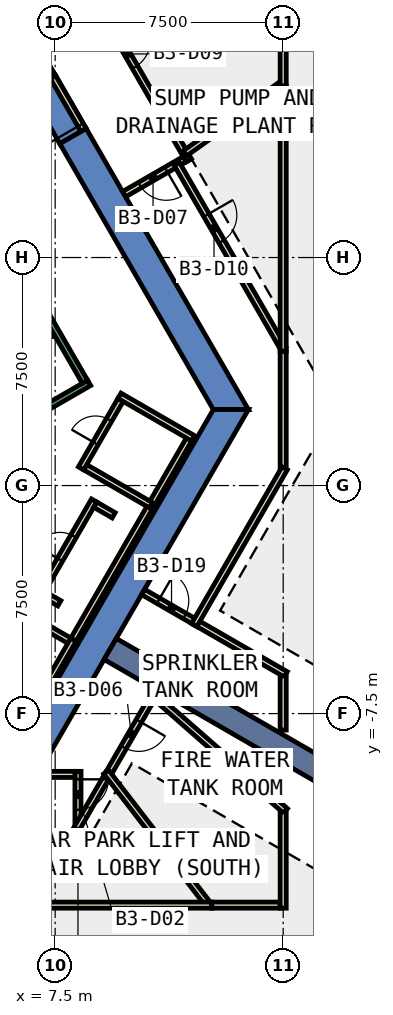
"""IFC4 building model, lengths in metres.
Left out: names, types, materials, properties, quantities, classifications, styles, units other than length and angle.
Written with IfcOpenShell. Run it as: python <this file> out.ifc"""

import sys

from ifc_helpers import new_model, si_unit, direction, frame, frame_2d, origin, place, context, subcontext, project, spatial, polyline, rectangle, outline, extrude, element, fill, save


model = new_model("IFC4")
c1 = context("Model", 3, precision=1e-05, world=origin(), true_north=direction((0.0, 1.0)))
c2 = subcontext(c1, "Body", "Model", "MODEL_VIEW")
j1 = project(units=[si_unit("LENGTHUNIT", "METRE"), si_unit("PLANEANGLEUNIT", "RADIAN")], contexts=[c1])
p1 = place(None, origin())
s1 = spatial("IfcSite", under=j1, at=p1, CompositionType="ELEMENT")
p2 = place(p1, origin())
s2 = spatial("IfcBuilding", under=s1, at=p2, CompositionType="ELEMENT")
p3 = place(p2, frame((0.0, 0.0, -16.5)))
s3 = spatial("IfcBuildingStorey", under=s2, at=p3, CompositionType="ELEMENT", Elevation=-16.5)
p4 = place(p3, origin())
e1 = element("IfcWall", 1, at=p4, inside=s3, PredefinedType="SHEAR", context=c2, shape_type="SweptSolid", body=[
    extrude(outline(polyline([(8.517, 11.748), (7.651, 11.248), (12.702, 2.5), (13.856, 2.5), (8.517, 11.748)])), origin(), (0.0, 0.0, 1.0), 5.08),
])
p5 = place(p3, origin())
e2 = element("IfcWall", 2, at=p5, inside=s3, PredefinedType="SHEAR", context=c2, shape_type="SweptSolid", body=[
    extrude(outline(polyline([(6.651, 12.98), (7.517, 13.48), (6.928, 14.5), (6.351, 13.5), (6.651, 12.98)])), origin(), (0.0, 0.0, 1.0), 5.08),
])
p6 = place(p3, frame((0.0, 0.0, 3.6)))
e3 = element("IfcWall", 3, at=p6, inside=s3, PredefinedType="SHEAR", context=c2, shape_type="SweptSolid", body=[
    extrude(outline(polyline([(7.517, 13.48), (6.651, 12.98), (7.651, 11.248), (8.517, 11.748), (7.517, 13.48)])), origin(), (0.0, 0.0, 1.0), 1.48),
])
p7 = place(p3, origin())
e4 = element("IfcWall", 4, at=p7, inside=s3, PredefinedType="SHEAR", context=c2, shape_type="SweptSolid", body=[
    extrude(outline(polyline([(6.928, -9.5), (13.856, 2.5), (12.702, 2.5), (6.351, -8.5), (6.928, -9.5)])), origin(), (0.0, 0.0, 1.0), 5.08),
])
p8 = place(p3, frame((9.31, -5.375, 0.0), z_axis=(0.0, 0.0, 1.0), x_axis=(0.866017533419, -0.500013631625, 0.0)))
e5 = element("IfcWall", 5, at=p8, inside=s3, PredefinedType="SHEAR", context=c2, shape_type="SweptSolid", body=[
    extrude(rectangle(XDim=9.0, YDim=0.8, at=frame_2d((4.5, 0.0))), origin(), (0.0, 0.0, 1.0), 5.08),
])
p9 = place(p3, frame((8.25, -9.4, 0.0), z_axis=(0.0, 0.0, 1.0), x_axis=(0.0, -1.0, 0.0)))
e6 = element("IfcWall", 6, at=p9, inside=s3, PredefinedType="PARTITIONING", context=c2, shape_type="SweptSolid", body=[
    extrude(rectangle(XDim=1.71, YDim=0.2, at=frame_2d((0.855, 0.0))), origin(), (0.0, 0.0, 1.0), 5.08),
])
p10 = place(p9, frame((0.262, 0.0, 0.0)))
e7 = element("IfcOpeningElement", 7, at=p10, cuts=e6, PredefinedType="OPENING", context=c2, shape_type="SweptSolid", body=[
    extrude(rectangle(XDim=1.0, YDim=2.1, at=frame_2d((0.5, 1.05))), frame((0.0, 0.11, 0.0), z_axis=(0.0, -1.0, 0.0), x_axis=(1.0, 0.0, 0.0)), (0.0, 0.0, 1.0), 0.22),
])
p11 = place(p3, frame((6.928, -9.5, 0.0), z_axis=(0.0, 0.0, 1.0), x_axis=(1.0, 0.0, 0.0)))
e8 = element("IfcWall", 8, at=p11, inside=s3, PredefinedType="PARTITIONING", context=c2, shape_type="SweptSolid", body=[
    extrude(rectangle(XDim=1.222, YDim=0.2, at=frame_2d((0.611, 0.0))), origin(), (0.0, 0.0, 1.0), 5.08),
])
p12 = place(p3, frame((8.25, -11.31, 0.0), z_axis=(0.0, 0.0, 1.0), x_axis=(0.0, -1.0, 0.0)))
e9 = element("IfcWall", 9, at=p12, inside=s3, PredefinedType="PARTITIONING", context=c2, shape_type="SweptSolid", body=[
    extrude(rectangle(XDim=0.49, YDim=0.2, at=frame_2d((0.245, 0.0))), origin(), (0.0, 0.0, 1.0), 5.08),
])
p13 = place(p3, frame((8.35, -11.9, 0.0), z_axis=(0.0, 0.0, 1.0), x_axis=(-1.0, 0.0, 0.0)))
e10 = element("IfcWall", 10, at=p13, inside=s3, PredefinedType="PARTITIONING", context=c2, shape_type="SweptSolid", body=[
    extrude(rectangle(XDim=7.039, YDim=0.2, at=frame_2d((3.52, 0.0))), origin(), (0.0, 0.0, 1.0), 5.08),
])
p14 = place(p13, frame((2.659, 0.0, 0.0)))
e11 = element("IfcOpeningElement", 11, at=p14, cuts=e10, PredefinedType="OPENING", context=c2, shape_type="SweptSolid", body=[
    extrude(rectangle(XDim=1.0, YDim=2.1, at=frame_2d((0.5, 1.05))), frame((0.0, 0.11, 0.0), z_axis=(0.0, -1.0, 0.0), x_axis=(1.0, 0.0, 0.0)), (0.0, 0.0, 1.0), 0.22),
])
p15 = place(p3, frame((9.238, -9.498, 0.0), z_axis=(0.0, 0.0, 1.0), x_axis=(-0.499780113518, -0.866152318089, 0.0)))
e12 = element("IfcWall", 12, at=p15, inside=s3, PredefinedType="PARTITIONING", context=c2, shape_type="SweptSolid", body=[
    extrude(rectangle(XDim=2.077, YDim=0.2, at=frame_2d((1.039, 0.0))), origin(), (0.0, 0.0, 1.0), 5.08),
])
p16 = place(p3, frame((10.738, -6.901, 0.0), z_axis=(0.0, 0.0, 1.0), x_axis=(-0.500131122175, -0.865949687125, 0.0)))
e13 = element("IfcWall", 13, at=p16, inside=s3, PredefinedType="PARTITIONING", context=c2, shape_type="SweptSolid", body=[
    extrude(rectangle(XDim=2.999, YDim=0.2, at=frame_2d((1.5, 0.0))), origin(), (0.0, 0.0, 1.0), 5.08),
])
p17 = place(p16, frame((0.972, 0.0, 0.0)))
e14 = element("IfcOpeningElement", 14, at=p17, cuts=e13, PredefinedType="OPENING", context=c2, shape_type="SweptSolid", body=[
    extrude(rectangle(XDim=1.0, YDim=2.1, at=frame_2d((0.5, 1.05))), frame((0.0, 0.11, 0.0), z_axis=(0.0, -1.0, 0.0), x_axis=(1.0, 0.0, 0.0)), (0.0, 0.0, 1.0), 0.22),
])
p18 = place(p3, frame((9.177, -9.419, 0.0), z_axis=(0.0, 0.0, 1.0), x_axis=(0.610158732695, -0.792279193792, 0.0)))
e15 = element("IfcWall", 15, at=p18, inside=s3, PredefinedType="PARTITIONING", context=c2, shape_type="SweptSolid", body=[
    extrude(rectangle(XDim=5.53, YDim=0.2, at=frame_2d((2.765, 0.0))), origin(), (0.0, 0.0, 1.0), 5.08),
])
p19 = place(p3, frame((12.651, -13.8, 0.0), z_axis=(0.0, 0.0, 1.0), x_axis=(-1.0, 0.0, 0.0)))
e16 = element("IfcWall", 16, at=p19, inside=s3, PredefinedType="PARTITIONING", context=c2, shape_type="SweptSolid", body=[
    extrude(rectangle(XDim=11.154, YDim=0.2, at=frame_2d((5.577, 0.0))), origin(), (0.0, 0.0, 1.0), 5.08),
])
p20 = place(p19, frame((6.675, 0.0, 0.0)))
e17 = element("IfcOpeningElement", 17, at=p20, cuts=e16, PredefinedType="OPENING", context=c2, shape_type="SweptSolid", body=[
    extrude(rectangle(XDim=1.8, YDim=2.1, at=frame_2d((0.9, 1.05))), frame((0.0, 0.11, 0.0), z_axis=(0.0, -1.0, 0.0), x_axis=(1.0, 0.0, 0.0)), (0.0, 0.0, 1.0), 0.22),
])
p21 = place(p3, frame((14.9, -13.8, 0.0), z_axis=(0.0, 0.0, 1.0), x_axis=(-1.0, 0.0, 0.0)))
e18 = element("IfcWall", 18, at=p21, inside=s3, PredefinedType="PARTITIONING", context=c2, shape_type="SweptSolid", body=[
    extrude(rectangle(XDim=2.249, YDim=0.2, at=frame_2d((1.125, 0.0))), origin(), (0.0, 0.0, 1.0), 5.08),
])
p22 = place(p3, frame((10.663, -6.835, 0.0), z_axis=(0.0, 0.0, 1.0), x_axis=(0.752269740493, -0.658855247788, 0.0)))
e19 = element("IfcWall", 19, at=p22, inside=s3, PredefinedType="PARTITIONING", context=c2, shape_type="SweptSolid", body=[
    extrude(rectangle(XDim=5.865, YDim=0.2, at=frame_2d((2.932, 0.0))), origin(), (0.0, 0.0, 1.0), 5.08),
])
p23 = place(p3, frame((15.0, -10.733, 0.0), z_axis=(0.0, 0.0, 1.0), x_axis=(0.0, -1.0, 0.0)))
e20 = element("IfcWall", 20, at=p23, inside=s3, PredefinedType="PARTITIONING", context=c2, shape_type="SweptSolid", body=[
    extrude(rectangle(XDim=3.167, YDim=0.2, at=frame_2d((1.583, 0.0))), origin(), (0.0, 0.0, 1.0), 5.08),
])
p24 = place(p3, frame((10.392, -3.5, 0.0), z_axis=(0.0, 0.0, 1.0), x_axis=(0.866010750942, -0.50002537861, 0.0)))
e21 = element("IfcWall", 21, at=p24, inside=s3, PredefinedType="PARTITIONING", context=c2, shape_type="SweptSolid", body=[
    extrude(rectangle(XDim=2.0, YDim=0.2, at=frame_2d((1.0, 0.0))), origin(), (0.0, 0.0, 1.0), 5.08),
])
p25 = place(p24, frame((0.58, 0.0, 0.0)))
e22 = element("IfcOpeningElement", 22, at=p25, cuts=e21, PredefinedType="OPENING", context=c2, shape_type="SweptSolid", body=[
    extrude(rectangle(XDim=1.0, YDim=2.1, at=frame_2d((0.5, 1.05))), frame((0.0, 0.11, 0.0), z_axis=(0.0, -1.0, 0.0), x_axis=(1.0, 0.0, 0.0)), (0.0, 0.0, 1.0), 0.22),
])
p26 = place(p3, frame((12.124, -4.5, 0.0), z_axis=(0.0, 0.0, 1.0), x_axis=(0.866109535743, -0.499854250852, 0.0)))
e23 = element("IfcWall", 23, at=p26, inside=s3, PredefinedType="PARTITIONING", context=c2, shape_type="SweptSolid", body=[
    extrude(rectangle(XDim=3.421, YDim=0.2, at=frame_2d((1.71, 0.0))), origin(), (0.0, 0.0, 1.0), 5.08),
])
p27 = place(p3, frame((15.0, -6.26, 0.0), z_axis=(0.0, 0.0, 1.0), x_axis=(0.0, -1.0, 0.0)))
e24 = element("IfcWall", 24, at=p27, inside=s3, PredefinedType="PARTITIONING", context=c2, shape_type="SweptSolid", body=[
    extrude(rectangle(XDim=1.781, YDim=0.2, at=frame_2d((0.891, 0.0))), origin(), (0.0, 0.0, 1.0), 5.08),
])
p28 = place(p3, frame((11.845, 10.783, 0.0), z_axis=(0.0, 0.0, 1.0), x_axis=(-0.865973769406, -0.500089422704, 0.0)))
e25 = element("IfcWall", 25, at=p28, inside=s3, PredefinedType="PARTITIONING", context=c2, shape_type="SweptSolid", body=[
    extrude(rectangle(XDim=2.399, YDim=0.2, at=frame_2d((1.2, 0.0))), origin(), (0.0, 0.0, 1.0), 5.08),
])
p29 = place(p28, frame((0.8, 0.0, 0.0)))
e26 = element("IfcOpeningElement", 26, at=p29, cuts=e25, PredefinedType="OPENING", context=c2, shape_type="SweptSolid", body=[
    extrude(rectangle(XDim=1.0, YDim=2.1, at=frame_2d((0.5, 1.05))), frame((0.0, 0.11, 0.0), z_axis=(0.0, -1.0, 0.0), x_axis=(1.0, 0.0, 0.0)), (0.0, 0.0, 1.0), 0.22),
])
p30 = place(p3, frame((8.295, 16.932, 0.0), z_axis=(0.0, 0.0, 1.0), x_axis=(0.499982693035, -0.866035395735, 0.0)))
e27 = element("IfcWall", 27, at=p30, inside=s3, PredefinedType="PARTITIONING", context=c2, shape_type="SweptSolid", body=[
    extrude(rectangle(XDim=7.2, YDim=0.2, at=frame_2d((3.6, 0.0))), origin(), (0.0, 0.0, 1.0), 5.08),
])
p31 = place(p30, frame((2.659, 0.0, 0.0)))
e28 = element("IfcOpeningElement", 28, at=p31, cuts=e27, PredefinedType="OPENING", context=c2, shape_type="SweptSolid", body=[
    extrude(rectangle(XDim=1.0, YDim=2.1, at=frame_2d((0.5, 1.05))), frame((0.0, 0.11, 0.0), z_axis=(0.0, -1.0, 0.0), x_axis=(1.0, 0.0, 0.0)), (0.0, 0.0, 1.0), 0.22),
])
p32 = place(p3, frame((11.499, 10.583, 0.0), z_axis=(0.0, 0.0, 1.0), x_axis=(0.499994090379, -0.866028815679, 0.0)))
e29 = element("IfcWall", 29, at=p32, inside=s3, PredefinedType="PARTITIONING", context=c2, shape_type="SweptSolid", body=[
    extrude(rectangle(XDim=7.002, YDim=0.2, at=frame_2d((3.501, 0.0))), origin(), (0.0, 0.0, 1.0), 5.08),
])
p33 = place(p32, frame((1.952, 0.0, 0.0)))
e30 = element("IfcOpeningElement", 30, at=p33, cuts=e29, PredefinedType="OPENING", context=c2, shape_type="SweptSolid", body=[
    extrude(rectangle(XDim=1.0, YDim=2.1, at=frame_2d((0.5, 1.05))), frame((0.0, 0.11, 0.0), z_axis=(0.0, -1.0, 0.0), x_axis=(1.0, 0.0, 0.0)), (0.0, 0.0, 1.0), 0.22),
])
p34 = place(p3, frame((15.0, 4.419, 0.0), z_axis=(0.0, 0.0, 1.0), x_axis=(0.0, -1.0, 0.0)))
e31 = element("IfcWall", 31, at=p34, inside=s3, PredefinedType="PARTITIONING", context=c2, shape_type="SweptSolid", body=[
    extrude(rectangle(XDim=3.838, YDim=0.2, at=frame_2d((1.919, 0.0))), origin(), (0.0, 0.0, 1.0), 5.08),
])
p35 = place(p3, frame((15.05, 0.568, 0.0), z_axis=(0.0, 0.0, 1.0), x_axis=(-0.500047946832, -0.865997719899, 0.0)))
e32 = element("IfcWall", 32, at=p35, inside=s3, PredefinedType="PARTITIONING", context=c2, shape_type="SweptSolid", body=[
    extrude(rectangle(XDim=5.952, YDim=0.2, at=frame_2d((2.976, 0.0))), origin(), (0.0, 0.0, 1.0), 5.08),
])
p36 = place(p3, frame((14.919, 13.18, 0.0), z_axis=(0.0, 0.0, 1.0), x_axis=(-0.81313339858, -0.582077379833, 0.0)))
e33 = element("IfcWall", 33, at=p36, inside=s3, PredefinedType="PARTITIONING", context=c2, shape_type="SweptSolid", body=[
    extrude(rectangle(XDim=3.879, YDim=0.2, at=frame_2d((1.939, 0.0))), origin(), (0.0, 0.0, 1.0), 5.08),
])
p37 = place(p3, frame((15.0, 32.9, 0.0), z_axis=(0.0, 0.0, 1.0), x_axis=(0.0, -1.0, 0.0)))
e34 = element("IfcWall", 34, at=p37, inside=s3, PredefinedType="PARTITIONING", context=c2, shape_type="SweptSolid", body=[
    extrude(rectangle(XDim=19.762, YDim=0.2, at=frame_2d((9.881, 0.0))), origin(), (0.0, 0.0, 1.0), 5.08),
])
p38 = place(p37, frame((6.168, 0.0, 0.0)))
e35 = element("IfcOpeningElement", 35, at=p38, cuts=e34, PredefinedType="OPENING", context=c2, shape_type="SweptSolid", body=[
    extrude(rectangle(XDim=1.8, YDim=2.1, at=frame_2d((0.9, 1.05))), frame((0.0, 0.11, 0.0), z_axis=(0.0, -1.0, 0.0), x_axis=(1.0, 0.0, 0.0)), (0.0, 0.0, 1.0), 0.22),
])
p39 = place(p3, frame((15.0, 13.138, 0.0), z_axis=(0.0, 0.0, 1.0), x_axis=(0.0, -1.0, 0.0)))
e36 = element("IfcWall", 36, at=p39, inside=s3, PredefinedType="PARTITIONING", context=c2, shape_type="SweptSolid", body=[
    extrude(rectangle(XDim=8.719, YDim=0.2, at=frame_2d((4.359, 0.0))), origin(), (0.0, 0.0, 1.0), 5.08),
])
p40 = place(p3, frame((5.888, -3.902, 0.0), z_axis=(0.0, 0.0, 1.0), x_axis=(0.866022959057, -0.500004234368, 0.0)))
e37 = element("IfcWall", 37, at=p40, inside=s3, PredefinedType="PARTITIONING", context=c2, shape_type="SweptSolid", body=[
    extrude(rectangle(XDim=2.5, YDim=0.2, at=frame_2d((1.25, 0.0))), origin(), (0.0, 0.0, 1.0), 5.08),
])
p41 = place(p3, frame((8.103, -5.065, 0.0), z_axis=(0.0, 0.0, 1.0), x_axis=(-0.49996627774, -0.866044872465, 0.0)))
e38 = element("IfcWall", 38, at=p41, inside=s3, PredefinedType="PARTITIONING", context=c2, shape_type="SweptSolid", body=[
    extrude(rectangle(XDim=2.6, YDim=0.2, at=frame_2d((1.3, 0.0))), origin(), (0.0, 0.0, 1.0), 5.08),
])
p42 = place(p3, frame((7.637, -3.872, 0.0), z_axis=(0.0, 0.0, 1.0), x_axis=(-0.866158505053, 0.499769390944, 0.0)))
e39 = element("IfcWall", 39, at=p42, inside=s3, PredefinedType="PARTITIONING", context=c2, shape_type="SweptSolid", body=[
    extrude(rectangle(XDim=0.6, YDim=0.2, at=frame_2d((0.3, 0.0))), origin(), (0.0, 0.0, 1.0), 5.08),
])
p43 = place(p3, frame((6.981, -3.609, 0.0), z_axis=(0.0, 0.0, 1.0), x_axis=(0.499982693035, 0.866035395735, 0.0)))
e40 = element("IfcWall", 40, at=p43, inside=s3, PredefinedType="PARTITIONING", context=c2, shape_type="SweptSolid", body=[
    extrude(rectangle(XDim=3.6, YDim=0.2, at=frame_2d((1.8, 0.0))), origin(), (0.0, 0.0, 1.0), 5.08),
])
p44 = place(p43, frame((1.35, 0.0, 0.0)))
e41 = element("IfcOpeningElement", 41, at=p44, cuts=e40, PredefinedType="OPENING", context=c2, shape_type="SweptSolid", body=[
    extrude(rectangle(XDim=0.9, YDim=2.1, at=frame_2d((0.45, 1.05))), frame((0.0, 0.11, 0.0), z_axis=(0.0, -1.0, 0.0), x_axis=(1.0, 0.0, 0.0)), (0.0, 0.0, 1.0), 0.22),
])
p45 = place(p3, frame((8.817, -0.628, 0.0), z_axis=(0.0, 0.0, 1.0), x_axis=(0.866307342011, -0.4995113504, 0.0)))
e42 = element("IfcWall", 42, at=p45, inside=s3, PredefinedType="PARTITIONING", context=c2, shape_type="SweptSolid", body=[
    extrude(rectangle(XDim=0.701, YDim=0.2, at=frame_2d((0.351, 0.0))), origin(), (0.0, 0.0, 1.0), 5.08),
])
p46 = place(p3, frame((10.703, -0.562, 0.0), z_axis=(0.0, 0.0, 1.0), x_axis=(-0.500012382935, -0.866018254376, 0.0)))
e43 = element("IfcWall", 43, at=p46, inside=s3, PredefinedType="PARTITIONING", context=c2, shape_type="SweptSolid", body=[
    extrude(rectangle(XDim=5.199, YDim=0.2, at=frame_2d((2.6, 0.0))), origin(), (0.0, 0.0, 1.0), 5.08),
])
p47 = place(p3, frame((10.653, -0.648, 0.0), z_axis=(0.0, 0.0, 1.0), x_axis=(-0.866022959057, 0.500004234368, 0.0)))
e44 = element("IfcWall", 44, at=p47, inside=s3, PredefinedType="PARTITIONING", context=c2, shape_type="SweptSolid", body=[
    extrude(rectangle(XDim=2.5, YDim=0.2, at=frame_2d((1.25, 0.0))), origin(), (0.0, 0.0, 1.0), 5.08),
])
p48 = place(p3, frame((11.903, 1.517, 0.0), z_axis=(0.0, 0.0, 1.0), x_axis=(-0.499945471869, -0.866056883327, 0.0)))
e45 = element("IfcWall", 45, at=p48, inside=s3, PredefinedType="PARTITIONING", context=c2, shape_type="SweptSolid", body=[
    extrude(rectangle(XDim=2.401, YDim=0.2, at=frame_2d((1.2, 0.0))), origin(), (0.0, 0.0, 1.0), 5.08),
])
p49 = place(p3, frame((8.351, 0.565, 0.0), z_axis=(0.0, 0.0, 1.0), x_axis=(0.49989585183, 0.866085525409, 0.0)))
e46 = element("IfcWall", 46, at=p49, inside=s3, PredefinedType="PARTITIONING", context=c2, shape_type="SweptSolid", body=[
    extrude(rectangle(XDim=2.6, YDim=0.2, at=frame_2d((1.3, 0.0))), origin(), (0.0, 0.0, 1.0), 5.08),
])
p50 = place(p49, frame((0.95, 0.0, 0.0)))
e47 = element("IfcOpeningElement", 47, at=p50, cuts=e46, PredefinedType="OPENING", context=c2, shape_type="SweptSolid", body=[
    extrude(rectangle(XDim=0.9, YDim=2.1, at=frame_2d((0.45, 1.05))), frame((0.0, 0.11, 0.0), z_axis=(0.0, -1.0, 0.0), x_axis=(1.0, 0.0, 0.0)), (0.0, 0.0, 1.0), 0.22),
])
p51 = place(p3, frame((9.615, 2.953, 0.0), z_axis=(0.0, 0.0, 1.0), x_axis=(0.866056369097, -0.49994636267, 0.0)))
e48 = element("IfcWall", 48, at=p51, inside=s3, PredefinedType="PARTITIONING", context=c2, shape_type="SweptSolid", body=[
    extrude(rectangle(XDim=2.8, YDim=0.2, at=frame_2d((1.4, 0.0))), origin(), (0.0, 0.0, 1.0), 5.08),
])
p52 = place(p3, frame((8.43, 11.698, 0.0), z_axis=(0.0, 0.0, 1.0), x_axis=(-0.50002537861, 0.866010750942, 0.0)))
e49 = element("IfcWall", 49, at=p52, inside=s3, PredefinedType="PARTITIONING", context=c2, shape_type="SweptSolid", body=[
    extrude(rectangle(XDim=2.0, YDim=0.2, at=frame_2d((1.0, 0.0))), origin(), (0.0, 0.0, 1.0), 2.4),
])
p53 = place(p52, frame((0.19, 0.0, 0.0)))
e50 = element("IfcOpeningElement", 50, at=p53, cuts=e49, PredefinedType="OPENING", context=c2, shape_type="SweptSolid", body=[
    extrude(rectangle(XDim=1.8, YDim=2.1, at=frame_2d((0.9, 1.05))), frame((0.0, 0.11, 0.0), z_axis=(0.0, -1.0, 0.0), x_axis=(1.0, 0.0, 0.0)), (0.0, 0.0, 1.0), 0.22),
])
p54 = place(p3, frame((4.806, 1.176, 0.0), z_axis=(0.0, 0.0, 1.0), x_axis=(0.866059941101, 0.499940174841, 0.0)))
e51 = element("IfcWall", 51, at=p54, inside=s3, PredefinedType="STANDARD", context=c2, shape_type="SweptSolid", body=[
    extrude(rectangle(XDim=4.4, YDim=0.2, at=frame_2d((2.2, 0.0))), origin(), (0.0, 0.0, 1.0), 5.08),
])
p55 = place(p54, frame((1.65, 0.0, 0.0)))
e52 = element("IfcOpeningElement", 52, at=p55, cuts=e51, PredefinedType="OPENING", context=c2, shape_type="SweptSolid", body=[
    extrude(rectangle(XDim=1.1, YDim=2.2, at=frame_2d((0.55, 1.1))), frame((0.0, 0.11, 0.0), z_axis=(0.0, -1.0, 0.0), x_axis=(1.0, 0.0, 0.0)), (0.0, 0.0, 1.0), 0.22),
])
p56 = place(p3, frame((8.48, 3.412, 0.0), z_axis=(0.0, 0.0, 1.0), x_axis=(-0.499978703459, 0.866037698999, 0.0)))
e53 = element("IfcWall", 53, at=p56, inside=s3, PredefinedType="STANDARD", context=c2, shape_type="SweptSolid", body=[
    extrude(rectangle(XDim=6.9, YDim=0.2, at=frame_2d((3.45, 0.0))), origin(), (0.0, 0.0, 1.0), 5.08),
])
p57 = place(p10, origin())
e54 = element("IfcDoor", 54, at=p57, inside=s3, OperationType="SINGLE_SWING_RIGHT", PredefinedType="DOOR", context=c2, shape_type="SweptSolid", body=[
    extrude(rectangle(XDim=1.0, YDim=2.1, at=frame_2d((0.5, 1.05))), frame((0.0, 0.025, 0.0), z_axis=(0.0, -1.0, 0.0), x_axis=(1.0, 0.0, 0.0)), (0.0, 0.0, 1.0), 0.05),
])
fill(e7, e54)
p58 = place(p17, origin())
e55 = element("IfcDoor", 55, at=p58, inside=s3, OperationType="SINGLE_SWING_RIGHT", PredefinedType="DOOR", context=c2, shape_type="SweptSolid", body=[
    extrude(rectangle(XDim=1.0, YDim=2.1, at=frame_2d((0.5, 1.05))), frame((0.0, 0.025, 0.0), z_axis=(0.0, -1.0, 0.0), x_axis=(1.0, 0.0, 0.0)), (0.0, 0.0, 1.0), 0.05),
])
fill(e14, e55)
p59 = place(p29, origin())
e56 = element("IfcDoor", 56, at=p59, inside=s3, OperationType="SINGLE_SWING_LEFT", PredefinedType="DOOR", context=c2, shape_type="SweptSolid", body=[
    extrude(rectangle(XDim=1.0, YDim=2.1, at=frame_2d((0.5, 1.05))), frame((0.0, 0.025, 0.0), z_axis=(0.0, -1.0, 0.0), x_axis=(1.0, 0.0, 0.0)), (0.0, 0.0, 1.0), 0.05),
])
fill(e26, e56)
p60 = place(p31, origin())
e57 = element("IfcDoor", 57, at=p60, inside=s3, OperationType="SINGLE_SWING_LEFT", PredefinedType="DOOR", context=c2, shape_type="SweptSolid", body=[
    extrude(rectangle(XDim=1.0, YDim=2.1, at=frame_2d((0.5, 1.05))), frame((0.0, 0.025, 0.0), z_axis=(0.0, -1.0, 0.0), x_axis=(1.0, 0.0, 0.0)), (0.0, 0.0, 1.0), 0.05),
])
fill(e28, e57)
p61 = place(p33, origin())
e58 = element("IfcDoor", 58, at=p61, inside=s3, OperationType="SINGLE_SWING_RIGHT", PredefinedType="DOOR", context=c2, shape_type="SweptSolid", body=[
    extrude(rectangle(XDim=1.0, YDim=2.1, at=frame_2d((0.5, 1.05))), frame((0.0, 0.025, 0.0), z_axis=(0.0, -1.0, 0.0), x_axis=(1.0, 0.0, 0.0)), (0.0, 0.0, 1.0), 0.05),
])
fill(e30, e58)
p62 = place(p25, origin())
e59 = element("IfcDoor", 59, at=p62, inside=s3, OperationType="SINGLE_SWING_LEFT", PredefinedType="DOOR", context=c2, shape_type="SweptSolid", body=[
    extrude(rectangle(XDim=1.0, YDim=2.1, at=frame_2d((0.5, 1.05))), frame((0.0, 0.025, 0.0), z_axis=(0.0, -1.0, 0.0), x_axis=(1.0, 0.0, 0.0)), (0.0, 0.0, 1.0), 0.05),
])
fill(e22, e59)
p63 = place(p44, origin())
e60 = element("IfcDoor", 60, at=p63, inside=s3, OperationType="SINGLE_SWING_RIGHT", PredefinedType="DOOR", context=c2, shape_type="SweptSolid", body=[
    extrude(rectangle(XDim=0.9, YDim=2.1, at=frame_2d((0.45, 1.05))), frame((0.0, 0.025, 0.0), z_axis=(0.0, -1.0, 0.0), x_axis=(1.0, 0.0, 0.0)), (0.0, 0.0, 1.0), 0.05),
])
fill(e41, e60)
p64 = place(p50, origin())
e61 = element("IfcDoor", 61, at=p64, inside=s3, OperationType="SINGLE_SWING_LEFT", PredefinedType="DOOR", context=c2, shape_type="SweptSolid", body=[
    extrude(rectangle(XDim=0.9, YDim=2.1, at=frame_2d((0.45, 1.05))), frame((0.0, 0.025, 0.0), z_axis=(0.0, -1.0, 0.0), x_axis=(1.0, 0.0, 0.0)), (0.0, 0.0, 1.0), 0.05),
])
fill(e47, e61)
p65 = place(p53, origin())
e62 = element("IfcDoor", 62, at=p65, inside=s3, OperationType="DOUBLE_DOOR_SINGLE_SWING", PredefinedType="DOOR", context=c2, shape_type="SweptSolid", body=[
    extrude(rectangle(XDim=1.8, YDim=2.1, at=frame_2d((0.9, 1.05))), frame((0.0, 0.025, 0.0), z_axis=(0.0, -1.0, 0.0), x_axis=(1.0, 0.0, 0.0)), (0.0, 0.0, 1.0), 0.05),
])
fill(e50, e62)
save(model, sys.argv[1])
